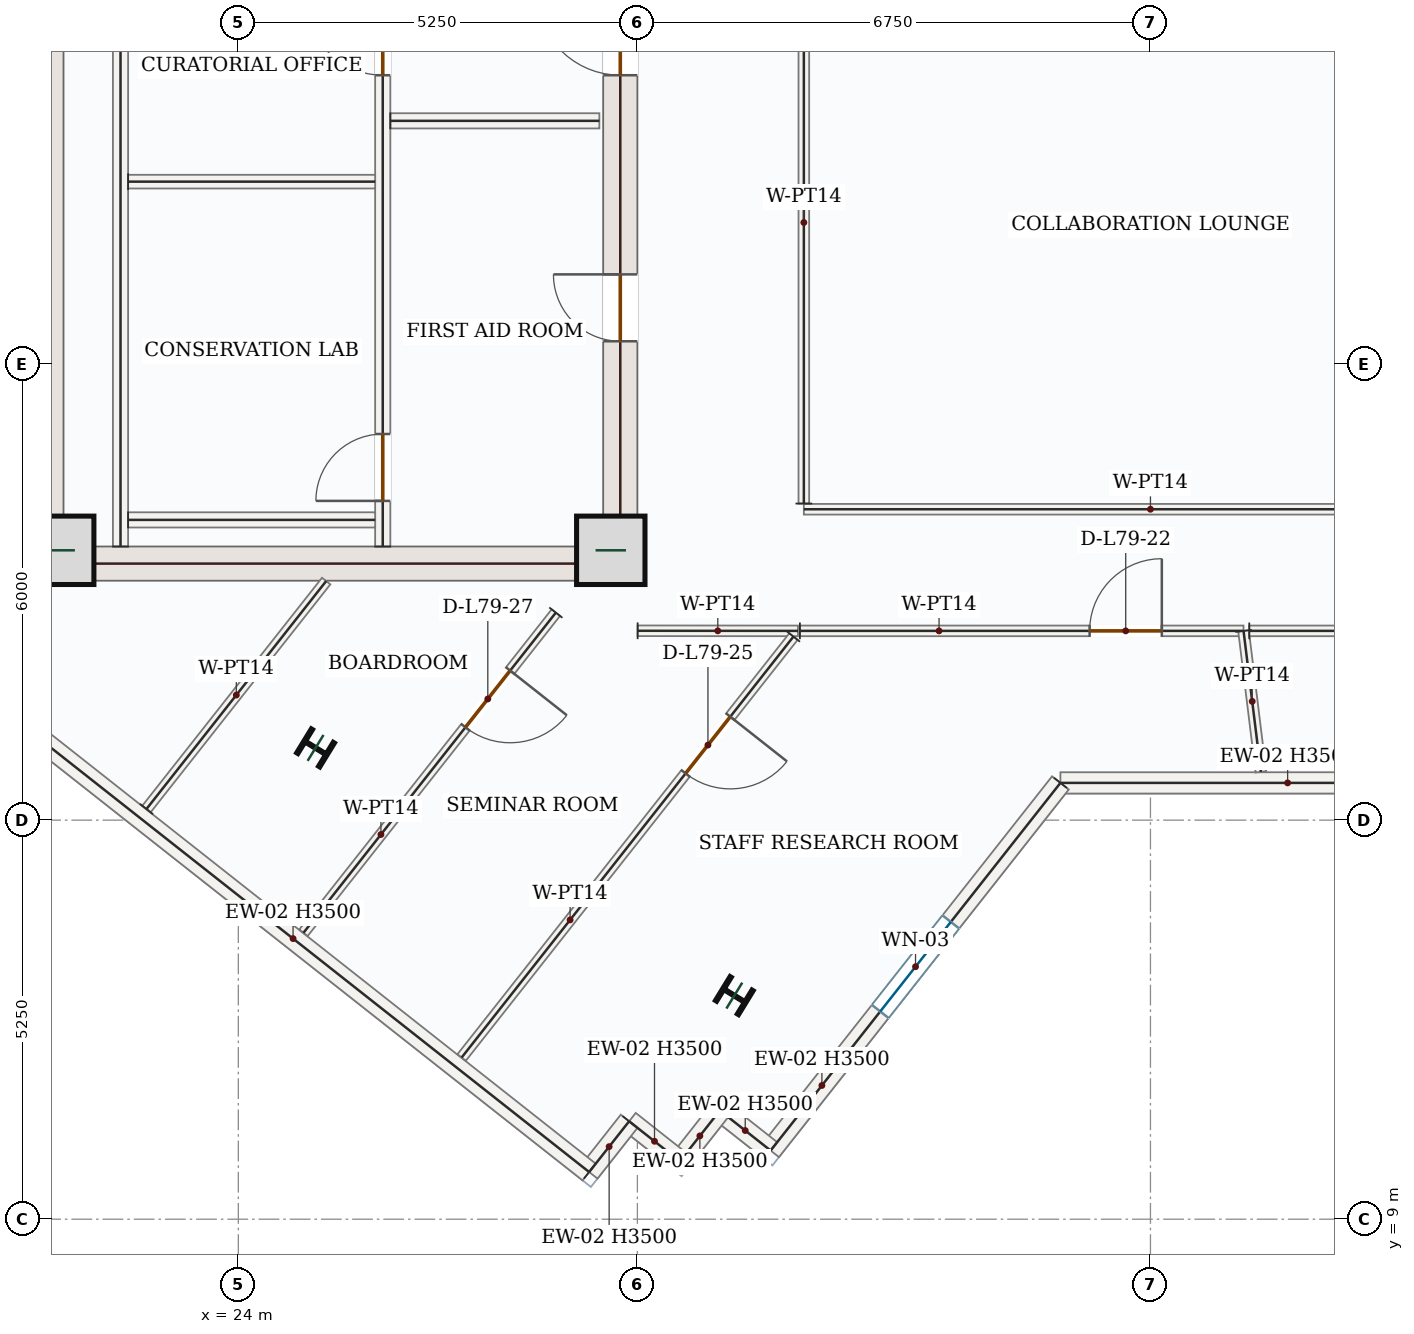
"""IFC4 building model, lengths in metres.
Left out: names, types, materials, properties, quantities, classifications, styles, units other than length and angle.
Written with IfcOpenShell. Run it as: python <this file> out.ifc"""

import sys

from ifc_helpers import new_model, si_unit, direction, frame, frame_2d, origin, origin_2d, place, context, subcontext, project, spatial, rectangle, i_section, extrude, source, transform, mapped, element, fill, save


model = new_model("IFC4")
c1 = context("Model", 3, precision=1e-05, world=origin(), true_north=direction((0.0, 1.0)))
c2 = subcontext(c1, "Body", "Model", "MODEL_VIEW")
j1 = project(units=[si_unit("LENGTHUNIT", "METRE"), si_unit("PLANEANGLEUNIT", "RADIAN")], contexts=[c1])
p1 = place(None, origin())
s1 = spatial("IfcSite", under=j1, at=p1, CompositionType="ELEMENT")
p2 = place(p1, origin())
s2 = spatial("IfcBuilding", under=s1, at=p2, CompositionType="ELEMENT")
p3 = place(p2, frame((0.0, 0.0, 327.3)))
s3 = spatial("IfcBuildingStorey", under=s2, at=p3, CompositionType="ELEMENT", Elevation=327.3)
m1 = source(origin(), c2, "Body", "SweptSolid", [
    extrude(rectangle(XDim=8.55, YDim=0.45, at=frame_2d((4.275, 0.0))), origin(), (0.0, 0.0, 1.0), 3.5),
])
p4 = place(p3, frame((21.475, 17.4, 0.0), z_axis=(0.0, 0.0, 1.0), x_axis=(0.0, 1.0, 0.0)))
e1 = element("IfcWall", 1, at=p4, inside=s3, PredefinedType="SHEAR", context=c2, shape_type="MappedRepresentation", body=[
    mapped(m1, transform((0.0, 0.0, 0.0), x_axis=(1.0, 0.0, 0.0), y_axis=(0.0, 1.0, 0.0), z_axis=(0.0, 0.0, 1.0), scale=1.0)),
])
p5 = place(p3, frame((29.025, 17.4, 0.0), z_axis=(0.0, 0.0, 1.0), x_axis=(0.0, 1.0, 0.0)))
e2 = element("IfcWall", 2, at=p5, inside=s3, PredefinedType="SHEAR", context=c2, shape_type="SweptSolid", body=[
    extrude(rectangle(XDim=8.55, YDim=0.45, at=frame_2d((4.275, 0.0))), origin(), (0.0, 0.0, 1.0), 3.5),
])
p6 = place(p5, frame((6.65, 0.0, 0.0)))
e3 = element("IfcOpeningElement", 3, at=p6, cuts=e2, PredefinedType="OPENING", context=c2, shape_type="SweptSolid", body=[
    extrude(rectangle(XDim=1.1, YDim=2.2, at=frame_2d((0.55, 1.1))), frame((0.0, 0.235, 0.0), z_axis=(0.0, -1.0, 0.0), x_axis=(1.0, 0.0, 0.0)), (0.0, 0.0, 1.0), 0.47),
])
p7 = place(p5, frame((3.15, 0.0, 0.0)))
e4 = element("IfcOpeningElement", 4, at=p7, cuts=e2, PredefinedType="OPENING", context=c2, shape_type="SweptSolid", body=[
    extrude(rectangle(XDim=0.88, YDim=2.1, at=frame_2d((0.44, 1.05))), frame((0.0, 0.235, 0.0), z_axis=(0.0, -1.0, 0.0), x_axis=(1.0, 0.0, 0.0)), (0.0, 0.0, 1.0), 0.47),
])
m2 = source(origin(), c2, "Body", "SweptSolid", [
    extrude(rectangle(XDim=7.1, YDim=0.45, at=frame_2d((3.55, 0.0))), origin(), (0.0, 0.0, 1.0), 3.5),
])
p8 = place(p3, frame((21.7, 17.625, 0.0), z_axis=(0.0, 0.0, 1.0), x_axis=(1.0, 0.0, 0.0)))
e5 = element("IfcWall", 5, at=p8, inside=s3, PredefinedType="SHEAR", context=c2, shape_type="MappedRepresentation", body=[
    mapped(m2, transform((0.0, 0.0, 0.0), x_axis=(1.0, 0.0, 0.0), y_axis=(0.0, 1.0, 0.0), z_axis=(0.0, 0.0, 1.0), scale=1.0)),
])
m3 = source(origin(), c2, "Body", "SweptSolid", [
    extrude(rectangle(XDim=0.9, YDim=0.9, at=origin_2d()), origin(), (0.0, 0.0, 1.0), 3.75),
])
for number, where, z_axis, x_axis in (
    (6, (21.65, 17.8, 0.0), (0.0, 0.0, 1.0), (1.0, 0.0, 0.0)),
    (7, (28.9, 17.8, 0.0), (0.0, 0.0, 1.0), (1.0, 0.0, 0.0)),
):
    element("IfcColumn", number, at=place(p3, frame(where, z_axis=z_axis, x_axis=x_axis)), inside=s3, PredefinedType="COLUMN", context=c2, shape_type="MappedRepresentation", body=[
        mapped(m3, transform((0.0, 0.0, 0.0), x_axis=(1.0, 0.0, 0.0), y_axis=(0.0, 1.0, 0.0), z_axis=(0.0, 0.0, 1.0), scale=1.0)),
    ])
m4 = source(origin(), c2, "Body", "SweptSolid", [
    extrude(i_section(OverallWidth=0.369, OverallDepth=0.356, WebThickness=0.011, FlangeThickness=0.018, FilletRadius=0.018, at=origin_2d()), origin(), (0.0, 0.0, 1.0), 3.75),
])
for number, where, z_axis, x_axis in (
    (8, (25.016, 15.2, 0.0), (0.0, 0.0, 1.0), (0.522, 0.853, 0.0)),
    (9, (30.525, 11.942, 0.0), (0.0, 0.0, 1.0), (0.522, 0.853, 0.0)),
):
    element("IfcColumn", number, at=place(p3, frame(where, z_axis=z_axis, x_axis=x_axis)), inside=s3, PredefinedType="COLUMN", context=c2, shape_type="MappedRepresentation", body=[
        mapped(m4, transform((0.0, 0.0, 0.0), x_axis=(1.0, 0.0, 0.0), y_axis=(0.0, 1.0, 0.0), z_axis=(0.0, 0.0, 1.0), scale=1.0)),
    ])
m5 = source(origin(), c2, "Body", "SweptSolid", [
    extrude(rectangle(XDim=5.978, YDim=0.28, at=frame_2d((2.989, 0.0))), origin(), (0.0, 0.0, 1.0), 3.5),
])
p9 = place(p3, frame((40.794, 14.74, 0.0), z_axis=(0.0, 0.0, 1.0), x_axis=(-1.0, 0.0, 0.0)))
e10 = element("IfcWall", 10, at=p9, inside=s3, PredefinedType="SOLIDWALL", context=c2, shape_type="MappedRepresentation", body=[
    mapped(m5, transform((0.0, 0.0, 0.0), x_axis=(1.0, 0.0, 0.0), y_axis=(0.0, 1.0, 0.0), z_axis=(0.0, 0.0, 1.0), scale=1.0)),
])
p10 = place(p3, frame((34.816, 14.74, 0.0), z_axis=(0.0, 0.0, 1.0), x_axis=(-0.619100474058, -0.78531178714, 0.0)))
e11 = element("IfcWall", 11, at=p10, inside=s3, PredefinedType="SOLIDWALL", context=c2, shape_type="SweptSolid", body=[
    extrude(rectangle(XDim=6.159, YDim=0.28, at=frame_2d((3.08, 0.0))), origin(), (0.0, 0.0, 1.0), 3.5),
])
p11 = place(p10, frame((2.329, 0.0, 0.85)))
e12 = element("IfcOpeningElement", 12, at=p11, cuts=e11, PredefinedType="OPENING", context=c2, shape_type="SweptSolid", body=[
    extrude(rectangle(XDim=1.5, YDim=1.5, at=frame_2d((0.75, 0.75))), frame((0.0, 0.15, 0.0), z_axis=(0.0, -1.0, 0.0), x_axis=(1.0, 0.0, 0.0)), (0.0, 0.0, 1.0), 0.3),
])
m6 = source(origin(), c2, "Body", "SweptSolid", [
    extrude(rectangle(XDim=0.85, YDim=0.28, at=frame_2d((0.425, 0.0))), origin(), (0.0, 0.0, 1.0), 3.5),
])
p12 = place(p3, frame((31.003, 9.903, 0.0), z_axis=(0.0, 0.0, 1.0), x_axis=(-0.785220826193, 0.619215838066, 0.0)))
e13 = element("IfcWall", 13, at=p12, inside=s3, PredefinedType="SOLIDWALL", context=c2, shape_type="MappedRepresentation", body=[
    mapped(m6, transform((0.0, 0.0, 0.0), x_axis=(1.0, 0.0, 0.0), y_axis=(0.0, 1.0, 0.0), z_axis=(0.0, 0.0, 1.0), scale=1.0)),
])
m7 = source(origin(), c2, "Body", "SweptSolid", [
    extrude(rectangle(XDim=0.85, YDim=0.28, at=frame_2d((0.425, 0.0))), origin(), (0.0, 0.0, 1.0), 3.5),
])
for number, where, z_axis, x_axis in (
    (14, (30.335, 10.43, 0.0), (0.0, 0.0, 1.0), (-0.619, -0.785, 0.0)),
    (15, (29.809, 9.762, 0.0), (0.0, 0.0, 1.0), (-0.785, 0.619, 0.0)),
):
    element("IfcWall", number, at=place(p3, frame(where, z_axis=z_axis, x_axis=x_axis)), inside=s3, PredefinedType="SOLIDWALL", context=c2, shape_type="MappedRepresentation", body=[
        mapped(m7, transform((0.0, 0.0, 0.0), x_axis=(1.0, 0.0, 0.0), y_axis=(0.0, 1.0, 0.0), z_axis=(0.0, 0.0, 1.0), scale=1.0)),
    ])
p13 = place(p3, frame((29.142, 10.288, 0.0), z_axis=(0.0, 0.0, 1.0), x_axis=(-0.619215838066, -0.785220826193, 0.0)))
e16 = element("IfcWall", 16, at=p13, inside=s3, PredefinedType="SOLIDWALL", context=c2, shape_type="MappedRepresentation", body=[
    mapped(m6, transform((0.0, 0.0, 0.0), x_axis=(1.0, 0.0, 0.0), y_axis=(0.0, 1.0, 0.0), z_axis=(0.0, 0.0, 1.0), scale=1.0)),
])
m8 = source(origin(), c2, "Body", "SweptSolid", [
    extrude(rectangle(XDim=9.92, YDim=0.28, at=frame_2d((4.96, 0.0))), origin(), (0.0, 0.0, 1.0), 3.5),
])
p14 = place(p3, frame((28.615, 9.621, 0.0), z_axis=(0.0, 0.0, 1.0), x_axis=(-0.785317257435, 0.619093535077, 0.0)))
e17 = element("IfcWall", 17, at=p14, inside=s3, PredefinedType="SOLIDWALL", context=c2, shape_type="MappedRepresentation", body=[
    mapped(m8, transform((0.0, 0.0, 0.0), x_axis=(1.0, 0.0, 0.0), y_axis=(0.0, 1.0, 0.0), z_axis=(0.0, 0.0, 1.0), scale=1.0)),
])
m9 = source(origin(), c2, "Body", "SweptSolid", [
    extrude(rectangle(XDim=7.87, YDim=0.2, at=frame_2d((3.935, 0.0))), origin(), (0.0, 0.0, 1.0), 3.5),
])
p15 = place(p3, frame((22.45, 17.85, 0.0), z_axis=(0.0, 0.0, 1.0), x_axis=(0.0, 1.0, 0.0)))
e18 = element("IfcWall", 18, at=p15, inside=s3, PredefinedType="SOLIDWALL", context=c2, shape_type="MappedRepresentation", body=[
    mapped(m9, transform((0.0, 0.0, 0.0), x_axis=(1.0, 0.0, 0.0), y_axis=(0.0, 1.0, 0.0), z_axis=(0.0, 0.0, 1.0), scale=1.0)),
])
p16 = place(p3, frame((25.9, 17.85, 0.0), z_axis=(0.0, 0.0, 1.0), x_axis=(0.0, 1.0, 0.0)))
e19 = element("IfcWall", 19, at=p16, inside=s3, PredefinedType="SOLIDWALL", context=c2, shape_type="SweptSolid", body=[
    extrude(rectangle(XDim=8.0, YDim=0.2, at=frame_2d((4.0, 0.0))), origin(), (0.0, 0.0, 1.0), 3.5),
])
p17 = place(p16, frame((6.2, 0.0, 0.0)))
e20 = element("IfcOpeningElement", 20, at=p17, cuts=e19, PredefinedType="OPENING", context=c2, shape_type="SweptSolid", body=[
    extrude(rectangle(XDim=1.0, YDim=2.15, at=frame_2d((0.5, 1.075))), frame((0.0, 0.11, 0.0), z_axis=(0.0, -1.0, 0.0), x_axis=(1.0, 0.0, 0.0)), (0.0, 0.0, 1.0), 0.22),
])
p18 = place(p16, frame((0.6, 0.0, 0.0)))
e21 = element("IfcOpeningElement", 21, at=p18, cuts=e19, PredefinedType="OPENING", context=c2, shape_type="SweptSolid", body=[
    extrude(rectangle(XDim=0.88, YDim=2.1, at=frame_2d((0.44, 1.05))), frame((0.0, 0.11, 0.0), z_axis=(0.0, -1.0, 0.0), x_axis=(1.0, 0.0, 0.0)), (0.0, 0.0, 1.0), 0.22),
])
m10 = source(origin(), c2, "Body", "SweptSolid", [
    extrude(rectangle(XDim=3.25, YDim=0.2, at=frame_2d((1.625, 0.0))), origin(), (0.0, 0.0, 1.0), 3.5),
])
p19 = place(p3, frame((22.55, 18.2, 0.0), z_axis=(0.0, 0.0, 1.0), x_axis=(1.0, 0.0, 0.0)))
e22 = element("IfcWall", 22, at=p19, inside=s3, PredefinedType="SOLIDWALL", context=c2, shape_type="MappedRepresentation", body=[
    mapped(m10, transform((0.0, 0.0, 0.0), x_axis=(1.0, 0.0, 0.0), y_axis=(0.0, 1.0, 0.0), z_axis=(0.0, 0.0, 1.0), scale=1.0)),
])
m11 = source(origin(), c2, "Body", "SweptSolid", [
    extrude(rectangle(XDim=3.25, YDim=0.18, at=frame_2d((1.625, 0.0))), origin(), (0.0, 0.0, 1.0), 3.5),
])
p20 = place(p3, frame((22.55, 22.65, 0.0), z_axis=(0.0, 0.0, 1.0), x_axis=(1.0, 0.0, 0.0)))
e23 = element("IfcWall", 23, at=p20, inside=s3, PredefinedType="PARTITIONING", context=c2, shape_type="MappedRepresentation", body=[
    mapped(m11, transform((0.0, 0.0, 0.0), x_axis=(1.0, 0.0, 0.0), y_axis=(0.0, 1.0, 0.0), z_axis=(0.0, 0.0, 1.0), scale=1.0)),
])
m12 = source(origin(), c2, "Body", "SweptSolid", [
    extrude(rectangle(XDim=2.75, YDim=0.2, at=frame_2d((1.375, 0.0))), origin(), (0.0, 0.0, 1.0), 3.5),
])
p21 = place(p3, frame((26.0, 23.45, 0.0), z_axis=(0.0, 0.0, 1.0), x_axis=(1.0, 0.0, 0.0)))
e24 = element("IfcWall", 24, at=p21, inside=s3, PredefinedType="SOLIDWALL", context=c2, shape_type="MappedRepresentation", body=[
    mapped(m12, transform((0.0, 0.0, 0.0), x_axis=(1.0, 0.0, 0.0), y_axis=(0.0, 1.0, 0.0), z_axis=(0.0, 0.0, 1.0), scale=1.0)),
])
m13 = source(origin(), c2, "Body", "SweptSolid", [
    extrude(rectangle(XDim=3.818, YDim=0.14, at=frame_2d((1.909, 0.0))), origin(), (0.0, 0.0, 1.0), 3.5),
])
p22 = place(p3, frame((22.792, 14.396, 0.0), z_axis=(0.0, 0.0, 1.0), x_axis=(0.619119655452, 0.78529666511, 0.0)))
e25 = element("IfcWall", 25, at=p22, inside=s3, PredefinedType="PARTITIONING", context=c2, shape_type="MappedRepresentation", body=[
    mapped(m13, transform((0.0, 0.0, 0.0), x_axis=(1.0, 0.0, 0.0), y_axis=(0.0, 1.0, 0.0), z_axis=(0.0, 0.0, 1.0), scale=1.0)),
])
p23 = place(p3, frame((28.177, 16.98, 0.0), z_axis=(0.0, 0.0, 1.0), x_axis=(-0.619105408422, -0.785307897109, 0.0)))
e26 = element("IfcWall", 26, at=p23, inside=s3, PredefinedType="PARTITIONING", context=c2, shape_type="SweptSolid", body=[
    extrude(rectangle(XDim=5.363, YDim=0.14, at=frame_2d((2.682, 0.0))), origin(), (0.0, 0.0, 1.0), 3.5),
])
p24 = place(p23, frame((0.971, 0.0, 0.0)))
e27 = element("IfcOpeningElement", 27, at=p24, cuts=e26, PredefinedType="OPENING", context=c2, shape_type="SweptSolid", body=[
    extrude(rectangle(XDim=0.95, YDim=2.15, at=frame_2d((0.475, 1.075))), frame((0.0, 0.08, 0.0), z_axis=(0.0, -1.0, 0.0), x_axis=(1.0, 0.0, 0.0)), (0.0, 0.0, 1.0), 0.16),
])
m14 = source(origin(), c2, "Body", "SweptSolid", [
    extrude(rectangle(XDim=2.109, YDim=0.14, at=frame_2d((1.054, 0.0))), origin(), (0.0, 0.0, 1.0), 3.5),
])
p25 = place(p3, frame((29.253, 16.741, 0.0), z_axis=(0.0, 0.0, 1.0), x_axis=(0.999999832474, -0.000578837597, 0.0)))
e28 = element("IfcWall", 28, at=p25, inside=s3, PredefinedType="PARTITIONING", context=c2, shape_type="MappedRepresentation", body=[
    mapped(m14, transform((0.0, 0.0, 0.0), x_axis=(1.0, 0.0, 0.0), y_axis=(0.0, 1.0, 0.0), z_axis=(0.0, 0.0, 1.0), scale=1.0)),
])
p26 = place(p3, frame((31.303, 16.665, 0.0), z_axis=(0.0, 0.0, 1.0), x_axis=(-0.619105259882, -0.785308014213, 0.0)))
e29 = element("IfcWall", 29, at=p26, inside=s3, PredefinedType="PARTITIONING", context=c2, shape_type="SweptSolid", body=[
    extrude(rectangle(XDim=7.051, YDim=0.14, at=frame_2d((3.525, 0.0))), origin(), (0.0, 0.0, 1.0), 3.5),
])
p27 = place(p26, frame((1.342, 0.0, 0.0)))
e30 = element("IfcOpeningElement", 30, at=p27, cuts=e29, PredefinedType="OPENING", context=c2, shape_type="SweptSolid", body=[
    extrude(rectangle(XDim=0.95, YDim=2.15, at=frame_2d((0.475, 1.075))), frame((0.0, 0.08, 0.0), z_axis=(0.0, -1.0, 0.0), x_axis=(1.0, 0.0, 0.0)), (0.0, 0.0, 1.0), 0.16),
])
p28 = place(p3, frame((31.388, 16.74, 0.0), z_axis=(0.0, 0.0, 1.0), x_axis=(1.0, 0.0, 0.0)))
e31 = element("IfcWall", 31, at=p28, inside=s3, PredefinedType="PARTITIONING", context=c2, shape_type="SweptSolid", body=[
    extrude(rectangle(XDim=5.837, YDim=0.14, at=frame_2d((2.918, 0.0))), origin(), (0.0, 0.0, 1.0), 3.5),
])
p29 = place(p28, frame((3.812, 0.0, 0.0)))
e32 = element("IfcOpeningElement", 32, at=p29, cuts=e31, PredefinedType="OPENING", context=c2, shape_type="SweptSolid", body=[
    extrude(rectangle(XDim=0.95, YDim=2.15, at=frame_2d((0.475, 1.075))), frame((0.0, 0.08, 0.0), z_axis=(0.0, -1.0, 0.0), x_axis=(1.0, 0.0, 0.0)), (0.0, 0.0, 1.0), 0.16),
])
m15 = source(origin(), c2, "Body", "SweptSolid", [
    extrude(rectangle(XDim=1.869, YDim=0.14, at=frame_2d((0.934, 0.0))), origin(), (0.0, 0.0, 1.0), 3.5),
])
p30 = place(p3, frame((37.225, 16.74, 0.0), z_axis=(0.0, 0.0, 1.0), x_axis=(0.122153221409, -0.992511254596, 0.0)))
e33 = element("IfcWall", 33, at=p30, inside=s3, PredefinedType="PARTITIONING", context=c2, shape_type="MappedRepresentation", body=[
    mapped(m15, transform((0.0, 0.0, 0.0), x_axis=(1.0, 0.0, 0.0), y_axis=(0.0, 1.0, 0.0), z_axis=(0.0, 0.0, 1.0), scale=1.0)),
])
m16 = source(origin(), c2, "Body", "SweptSolid", [
    extrude(rectangle(XDim=5.444, YDim=0.14, at=frame_2d((2.722, 0.0))), origin(), (0.0, 0.0, 1.0), 3.5),
])
p31 = place(p3, frame((37.3, 16.74, 0.0), z_axis=(0.0, 0.0, 1.0), x_axis=(1.0, 0.0, 0.0)))
e34 = element("IfcWall", 34, at=p31, inside=s3, PredefinedType="PARTITIONING", context=c2, shape_type="MappedRepresentation", body=[
    mapped(m16, transform((0.0, 0.0, 0.0), x_axis=(1.0, 0.0, 0.0), y_axis=(0.0, 1.0, 0.0), z_axis=(0.0, 0.0, 1.0), scale=1.0)),
])
m17 = source(origin(), c2, "Body", "SweptSolid", [
    extrude(rectangle(XDim=9.12, YDim=0.14, at=frame_2d((4.56, 0.0))), origin(), (0.0, 0.0, 1.0), 3.5),
])
p32 = place(p3, frame((40.56, 18.34, 0.0), z_axis=(0.0, 0.0, 1.0), x_axis=(-1.0, 0.0, 0.0)))
e35 = element("IfcWall", 35, at=p32, inside=s3, PredefinedType="PARTITIONING", context=c2, shape_type="MappedRepresentation", body=[
    mapped(m17, transform((0.0, 0.0, 0.0), x_axis=(1.0, 0.0, 0.0), y_axis=(0.0, 1.0, 0.0), z_axis=(0.0, 0.0, 1.0), scale=1.0)),
])
m18 = source(origin(), c2, "Body", "SweptSolid", [
    extrude(rectangle(XDim=7.395, YDim=0.14, at=frame_2d((3.698, 0.0))), origin(), (0.0, 0.0, 1.0), 3.5),
])
p33 = place(p3, frame((31.44, 18.415, 0.0), z_axis=(0.0, 0.0, 1.0), x_axis=(0.0, 1.0, 0.0)))
e36 = element("IfcWall", 36, at=p33, inside=s3, PredefinedType="PARTITIONING", context=c2, shape_type="MappedRepresentation", body=[
    mapped(m18, transform((0.0, 0.0, 0.0), x_axis=(1.0, 0.0, 0.0), y_axis=(0.0, 1.0, 0.0), z_axis=(0.0, 0.0, 1.0), scale=1.0)),
])
m19 = source(origin(), c2, "Body", "SweptSolid", [
    extrude(rectangle(XDim=1.5, YDim=1.5, at=frame_2d((0.75, 0.75))), frame((0.0, 0.03, 0.0), z_axis=(0.0, -1.0, 0.0), x_axis=(1.0, 0.0, 0.0)), (0.0, 0.0, 1.0), 0.06),
])
p34 = place(p11, origin())
e37 = element("IfcWindow", 37, at=p34, inside=s3, PartitioningType="SINGLE_PANEL", PredefinedType="WINDOW", context=c2, shape_type="MappedRepresentation", body=[
    mapped(m19, transform((0.0, 0.0, 0.0), x_axis=(1.0, 0.0, 0.0), y_axis=(0.0, 1.0, 0.0), z_axis=(0.0, 0.0, 1.0), scale=1.0)),
])
fill(e12, e37)
m20 = source(origin(), c2, "Body", "SweptSolid", [
    extrude(rectangle(XDim=1.0, YDim=2.15, at=frame_2d((0.5, 1.075))), frame((0.0, 0.025, 0.0), z_axis=(0.0, -1.0, 0.0), x_axis=(1.0, 0.0, 0.0)), (0.0, 0.0, 1.0), 0.05),
])
p35 = place(p17, origin())
e38 = element("IfcDoor", 38, at=p35, inside=s3, OperationType="SINGLE_SWING_RIGHT", PredefinedType="DOOR", context=c2, shape_type="MappedRepresentation", body=[
    mapped(m20, transform((0.0, 0.0, 0.0), x_axis=(1.0, 0.0, 0.0), y_axis=(0.0, 1.0, 0.0), z_axis=(0.0, 0.0, 1.0), scale=1.0)),
])
fill(e20, e38)
m21 = source(origin(), c2, "Body", "SweptSolid", [
    extrude(rectangle(XDim=0.88, YDim=2.1, at=frame_2d((0.44, 1.05))), frame((0.0, 0.025, 0.0), z_axis=(0.0, -1.0, 0.0), x_axis=(1.0, 0.0, 0.0)), (0.0, 0.0, 1.0), 0.05),
])
p36 = place(p18, origin())
e39 = element("IfcDoor", 39, at=p36, inside=s3, OperationType="SINGLE_SWING_LEFT", PredefinedType="DOOR", context=c2, shape_type="MappedRepresentation", body=[
    mapped(m21, transform((0.0, 0.0, 0.0), x_axis=(1.0, 0.0, 0.0), y_axis=(0.0, 1.0, 0.0), z_axis=(0.0, 0.0, 1.0), scale=1.0)),
])
fill(e21, e39)
m22 = source(origin(), c2, "Body", "SweptSolid", [
    extrude(rectangle(XDim=1.1, YDim=2.2, at=frame_2d((0.55, 1.1))), frame((0.0, 0.025, 0.0), z_axis=(0.0, -1.0, 0.0), x_axis=(1.0, 0.0, 0.0)), (0.0, 0.0, 1.0), 0.05),
])
p37 = place(p6, origin())
e40 = element("IfcDoor", 40, at=p37, inside=s3, OperationType="SINGLE_SWING_RIGHT", PredefinedType="DOOR", context=c2, shape_type="MappedRepresentation", body=[
    mapped(m22, transform((0.0, 0.0, 0.0), x_axis=(1.0, 0.0, 0.0), y_axis=(0.0, 1.0, 0.0), z_axis=(0.0, 0.0, 1.0), scale=1.0)),
])
fill(e3, e40)
p38 = place(p7, origin())
e41 = element("IfcDoor", 41, at=p38, inside=s3, OperationType="SINGLE_SWING_RIGHT", PredefinedType="DOOR", context=c2, shape_type="MappedRepresentation", body=[
    mapped(m21, transform((0.0, 0.0, 0.0), x_axis=(1.0, 0.0, 0.0), y_axis=(0.0, 1.0, 0.0), z_axis=(0.0, 0.0, 1.0), scale=1.0)),
])
fill(e4, e41)
m23 = source(origin(), c2, "Body", "SweptSolid", [
    extrude(rectangle(XDim=0.95, YDim=2.15, at=frame_2d((0.475, 1.075))), frame((0.0, 0.025, 0.0), z_axis=(0.0, -1.0, 0.0), x_axis=(1.0, 0.0, 0.0)), (0.0, 0.0, 1.0), 0.05),
])
p39 = place(p29, origin())
e42 = element("IfcDoor", 42, at=p39, inside=s3, OperationType="SINGLE_SWING_RIGHT", PredefinedType="DOOR", context=c2, shape_type="MappedRepresentation", body=[
    mapped(m23, transform((0.0, 0.0, 0.0), x_axis=(1.0, 0.0, 0.0), y_axis=(0.0, 1.0, 0.0), z_axis=(0.0, 0.0, 1.0), scale=1.0)),
])
fill(e32, e42)
p40 = place(p27, origin())
e43 = element("IfcDoor", 43, at=p40, inside=s3, OperationType="SINGLE_SWING_LEFT", PredefinedType="DOOR", context=c2, shape_type="MappedRepresentation", body=[
    mapped(m23, transform((0.0, 0.0, 0.0), x_axis=(1.0, 0.0, 0.0), y_axis=(0.0, 1.0, 0.0), z_axis=(0.0, 0.0, 1.0), scale=1.0)),
])
fill(e30, e43)
p41 = place(p24, origin())
e44 = element("IfcDoor", 44, at=p41, inside=s3, OperationType="SINGLE_SWING_LEFT", PredefinedType="DOOR", context=c2, shape_type="MappedRepresentation", body=[
    mapped(m23, transform((0.0, 0.0, 0.0), x_axis=(1.0, 0.0, 0.0), y_axis=(0.0, 1.0, 0.0), z_axis=(0.0, 0.0, 1.0), scale=1.0)),
])
fill(e27, e44)
save(model, sys.argv[1])
